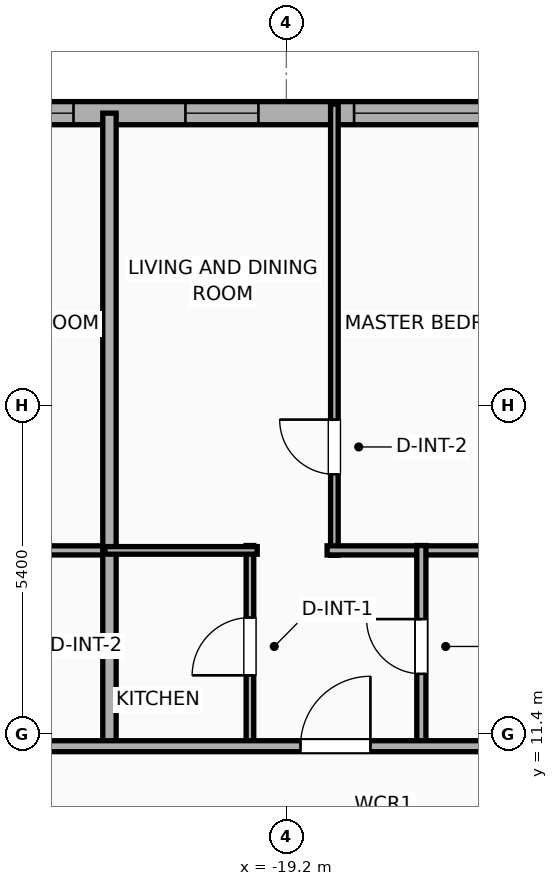
"""IFC4 building model, lengths in metres.
Left out: names, types, materials, properties, quantities, classifications, styles, units other than length and angle.
Written with IfcOpenShell. Run it as: python <this file> out.ifc"""

import sys

from ifc_helpers import new_model, si_unit, direction, frame, frame_2d, origin, place, context, subcontext, project, spatial, rectangle, extrude, element, fill, save


model = new_model("IFC4")
c1 = context("Model", 3, precision=1e-05, world=origin(), true_north=direction((0.0, 1.0)))
c2 = subcontext(c1, "Body", "Model", "MODEL_VIEW")
j1 = project(units=[si_unit("LENGTHUNIT", "METRE"), si_unit("PLANEANGLEUNIT", "RADIAN")], contexts=[c1])
p1 = place(None, origin())
s1 = spatial("IfcSite", under=j1, at=p1, CompositionType="ELEMENT")
p2 = place(p1, origin())
s2 = spatial("IfcBuilding", under=s1, at=p2, CompositionType="ELEMENT")
p3 = place(p2, frame((0.0, 0.0, 120.9)))
s3 = spatial("IfcBuildingStorey", under=s2, at=p3, CompositionType="ELEMENT", Elevation=120.9)
p4 = place(p3, frame((-25.381, 21.61, 0.0), z_axis=(0.0, 0.0, 1.0), x_axis=(1.0, 0.0, 0.0)))
e1 = element("IfcWall", 1, at=p4, inside=s3, PredefinedType="ELEMENTEDWALL", context=c2, shape_type="SweptSolid", body=[
    extrude(rectangle(XDim=54.763, YDim=0.38, at=frame_2d((27.381, 0.0))), origin(), (0.0, 0.0, 1.0), 3.65),
])
p5 = place(p4, frame((7.295, 0.0, 0.75)))
e2 = element("IfcOpeningElement", 2, at=p5, cuts=e1, PredefinedType="OPENING", context=c2, shape_type="SweptSolid", body=[
    extrude(rectangle(XDim=2.4, YDim=2.1, at=frame_2d((1.2, 1.05))), frame((0.0, 0.2, 0.0), z_axis=(0.0, -1.0, 0.0), x_axis=(1.0, 0.0, 0.0)), (0.0, 0.0, 1.0), 0.4),
])
p6 = place(p4, frame((17.686, 0.0, 0.75)))
e3 = element("IfcOpeningElement", 3, at=p6, cuts=e1, PredefinedType="OPENING", context=c2, shape_type="SweptSolid", body=[
    extrude(rectangle(XDim=2.4, YDim=2.1, at=frame_2d((1.2, 1.05))), frame((0.0, 0.2, 0.0), z_axis=(0.0, -1.0, 0.0), x_axis=(1.0, 0.0, 0.0)), (0.0, 0.0, 1.0), 0.4),
])
p7 = place(p4, frame((45.867, 0.0, 0.75)))
e4 = element("IfcOpeningElement", 4, at=p7, cuts=e1, PredefinedType="OPENING", context=c2, shape_type="SweptSolid", body=[
    extrude(rectangle(XDim=2.4, YDim=2.1, at=frame_2d((1.2, 1.05))), frame((0.0, 0.2, 0.0), z_axis=(0.0, -1.0, 0.0), x_axis=(1.0, 0.0, 0.0)), (0.0, 0.0, 1.0), 0.4),
])
p8 = place(p4, frame((1.481, 0.0, 0.75)))
e5 = element("IfcOpeningElement", 5, at=p8, cuts=e1, PredefinedType="OPENING", context=c2, shape_type="SweptSolid", body=[
    extrude(rectangle(XDim=1.2, YDim=2.05, at=frame_2d((0.6, 1.025))), frame((0.0, 0.2, 0.0), z_axis=(0.0, -1.0, 0.0), x_axis=(1.0, 0.0, 0.0)), (0.0, 0.0, 1.0), 0.4),
])
p9 = place(p4, frame((4.522, 0.0, 0.75)))
e6 = element("IfcOpeningElement", 6, at=p9, cuts=e1, PredefinedType="OPENING", context=c2, shape_type="SweptSolid", body=[
    extrude(rectangle(XDim=1.2, YDim=2.05, at=frame_2d((0.6, 1.025))), frame((0.0, 0.2, 0.0), z_axis=(0.0, -1.0, 0.0), x_axis=(1.0, 0.0, 0.0)), (0.0, 0.0, 1.0), 0.4),
])
p10 = place(p4, frame((11.696, 0.0, 0.75)))
e7 = element("IfcOpeningElement", 7, at=p10, cuts=e1, PredefinedType="OPENING", context=c2, shape_type="SweptSolid", body=[
    extrude(rectangle(XDim=1.2, YDim=2.05, at=frame_2d((0.6, 1.025))), frame((0.0, 0.2, 0.0), z_axis=(0.0, -1.0, 0.0), x_axis=(1.0, 0.0, 0.0)), (0.0, 0.0, 1.0), 0.4),
])
p11 = place(p4, frame((15.076, 0.0, 0.75)))
e8 = element("IfcOpeningElement", 8, at=p11, cuts=e1, PredefinedType="OPENING", context=c2, shape_type="SweptSolid", body=[
    extrude(rectangle(XDim=1.2, YDim=2.05, at=frame_2d((0.6, 1.025))), frame((0.0, 0.2, 0.0), z_axis=(0.0, -1.0, 0.0), x_axis=(1.0, 0.0, 0.0)), (0.0, 0.0, 1.0), 0.4),
])
p12 = place(p4, frame((22.676, 0.0, 0.75)))
e9 = element("IfcOpeningElement", 9, at=p12, cuts=e1, PredefinedType="OPENING", context=c2, shape_type="SweptSolid", body=[
    extrude(rectangle(XDim=1.2, YDim=2.05, at=frame_2d((0.6, 1.025))), frame((0.0, 0.2, 0.0), z_axis=(0.0, -1.0, 0.0), x_axis=(1.0, 0.0, 0.0)), (0.0, 0.0, 1.0), 0.4),
])
p13 = place(p4, frame((25.576, 0.0, 0.75)))
e10 = element("IfcOpeningElement", 10, at=p13, cuts=e1, PredefinedType="OPENING", context=c2, shape_type="SweptSolid", body=[
    extrude(rectangle(XDim=1.2, YDim=2.05, at=frame_2d((0.6, 1.025))), frame((0.0, 0.2, 0.0), z_axis=(0.0, -1.0, 0.0), x_axis=(1.0, 0.0, 0.0)), (0.0, 0.0, 1.0), 0.4),
])
p14 = place(p4, frame((29.076, 0.0, 0.75)))
e11 = element("IfcOpeningElement", 11, at=p14, cuts=e1, PredefinedType="OPENING", context=c2, shape_type="SweptSolid", body=[
    extrude(rectangle(XDim=1.2, YDim=2.05, at=frame_2d((0.6, 1.025))), frame((0.0, 0.2, 0.0), z_axis=(0.0, -1.0, 0.0), x_axis=(1.0, 0.0, 0.0)), (0.0, 0.0, 1.0), 0.4),
])
p15 = place(p4, frame((33.591, 0.0, 0.75)))
e12 = element("IfcOpeningElement", 12, at=p15, cuts=e1, PredefinedType="OPENING", context=c2, shape_type="SweptSolid", body=[
    extrude(rectangle(XDim=0.85, YDim=2.05, at=frame_2d((0.425, 1.025))), frame((0.0, 0.2, 0.0), z_axis=(0.0, -1.0, 0.0), x_axis=(1.0, 0.0, 0.0)), (0.0, 0.0, 1.0), 0.4),
])
p16 = place(p4, frame((36.076, 0.0, 0.75)))
e13 = element("IfcOpeningElement", 13, at=p16, cuts=e1, PredefinedType="OPENING", context=c2, shape_type="SweptSolid", body=[
    extrude(rectangle(XDim=1.2, YDim=2.05, at=frame_2d((0.6, 1.025))), frame((0.0, 0.2, 0.0), z_axis=(0.0, -1.0, 0.0), x_axis=(1.0, 0.0, 0.0)), (0.0, 0.0, 1.0), 0.4),
])
p17 = place(p4, frame((39.446, 0.0, 0.75)))
e14 = element("IfcOpeningElement", 14, at=p17, cuts=e1, PredefinedType="OPENING", context=c2, shape_type="SweptSolid", body=[
    extrude(rectangle(XDim=1.2, YDim=2.05, at=frame_2d((0.6, 1.025))), frame((0.0, 0.2, 0.0), z_axis=(0.0, -1.0, 0.0), x_axis=(1.0, 0.0, 0.0)), (0.0, 0.0, 1.0), 0.4),
])
p18 = place(p4, frame((42.27, 0.0, 0.75)))
e15 = element("IfcOpeningElement", 15, at=p18, cuts=e1, PredefinedType="OPENING", context=c2, shape_type="SweptSolid", body=[
    extrude(rectangle(XDim=0.85, YDim=2.05, at=frame_2d((0.425, 1.025))), frame((0.0, 0.2, 0.0), z_axis=(0.0, -1.0, 0.0), x_axis=(1.0, 0.0, 0.0)), (0.0, 0.0, 1.0), 0.4),
])
p19 = place(p4, frame((49.554, 0.0, 0.75)))
e16 = element("IfcOpeningElement", 16, at=p19, cuts=e1, PredefinedType="OPENING", context=c2, shape_type="SweptSolid", body=[
    extrude(rectangle(XDim=1.2, YDim=2.05, at=frame_2d((0.6, 1.025))), frame((0.0, 0.2, 0.0), z_axis=(0.0, -1.0, 0.0), x_axis=(1.0, 0.0, 0.0)), (0.0, 0.0, 1.0), 0.4),
])
p20 = place(p4, frame((52.266, 0.0, 0.75)))
e17 = element("IfcOpeningElement", 17, at=p20, cuts=e1, PredefinedType="OPENING", context=c2, shape_type="SweptSolid", body=[
    extrude(rectangle(XDim=1.2, YDim=2.05, at=frame_2d((0.6, 1.025))), frame((0.0, 0.2, 0.0), z_axis=(0.0, -1.0, 0.0), x_axis=(1.0, 0.0, 0.0)), (0.0, 0.0, 1.0), 0.4),
])
p21 = place(p3, frame((-25.639, 14.42, 0.0), z_axis=(0.0, 0.0, 1.0), x_axis=(1.0, 0.0, 0.0)))
e18 = element("IfcWall", 18, at=p21, inside=s3, PredefinedType="PLUMBINGWALL", context=c2, shape_type="SweptSolid", body=[
    extrude(rectangle(XDim=3.605, YDim=0.15, at=frame_2d((1.802, 0.0))), origin(), (0.0, 0.0, 1.0), 3.65),
])
p22 = place(p3, frame((-22.109, 11.12, 0.0), z_axis=(0.0, 0.0, 1.0), x_axis=(0.0, 1.0, 0.0)))
e19 = element("IfcWall", 19, at=p22, inside=s3, PredefinedType="PARTITIONING", context=c2, shape_type="SweptSolid", body=[
    extrude(rectangle(XDim=10.49, YDim=0.22, at=frame_2d((5.245, 0.0))), origin(), (0.0, 0.0, 1.0), 3.65),
])
p23 = place(p3, frame((-18.41, 14.34, 0.0), z_axis=(0.0, 0.0, 1.0), x_axis=(0.0, 1.0, 0.0)))
e20 = element("IfcWall", 20, at=p23, inside=s3, PredefinedType="PARTITIONING", context=c2, shape_type="SweptSolid", body=[
    extrude(rectangle(XDim=7.42, YDim=0.125, at=frame_2d((3.71, 0.0))), origin(), (0.0, 0.0, 1.0), 3.65),
])
p24 = place(p23, frame((1.331, 0.0, 0.0)))
e21 = element("IfcOpeningElement", 21, at=p24, cuts=e20, PredefinedType="OPENING", context=c2, shape_type="SweptSolid", body=[
    extrude(rectangle(XDim=0.9, YDim=2.05, at=frame_2d((0.45, 1.025))), frame((0.0, 0.073, 0.0), z_axis=(0.0, -1.0, 0.0), x_axis=(1.0, 0.0, 0.0)), (0.0, 0.0, 1.0), 0.145),
])
p25 = place(p3, frame((-18.53, 14.42, 0.0), z_axis=(0.0, 0.0, 1.0), x_axis=(1.0, 0.0, 0.0)))
e22 = element("IfcWall", 22, at=p25, inside=s3, PredefinedType="PLUMBINGWALL", context=c2, shape_type="SweptSolid", body=[
    extrude(rectangle(XDim=3.605, YDim=0.15, at=frame_2d((1.802, 0.0))), origin(), (0.0, 0.0, 1.0), 3.65),
])
p26 = place(p3, frame((-19.799, 11.18, 0.0), z_axis=(0.0, 0.0, 1.0), x_axis=(0.0, 1.0, 0.0)))
e23 = element("IfcWall", 23, at=p26, inside=s3, PredefinedType="PARTITIONING", context=c2, shape_type="SweptSolid", body=[
    extrude(rectangle(XDim=3.32, YDim=0.125, at=frame_2d((1.66, 0.0))), origin(), (0.0, 0.0, 1.0), 3.65),
])
p27 = place(p26, frame((1.185, 0.0, 0.0)))
e24 = element("IfcOpeningElement", 24, at=p27, cuts=e23, PredefinedType="OPENING", context=c2, shape_type="SweptSolid", body=[
    extrude(rectangle(XDim=0.95, YDim=2.05, at=frame_2d((0.475, 1.025))), frame((0.0, 0.073, 0.0), z_axis=(0.0, -1.0, 0.0), x_axis=(1.0, 0.0, 0.0)), (0.0, 0.0, 1.0), 0.145),
])
p28 = place(p3, frame((-22.184, 14.42, 0.0), z_axis=(0.0, 0.0, 1.0), x_axis=(1.0, 0.0, 0.0)))
e25 = element("IfcWall", 25, at=p28, inside=s3, PredefinedType="PARTITIONING", context=c2, shape_type="SweptSolid", body=[
    extrude(rectangle(XDim=2.505, YDim=0.125, at=frame_2d((1.252, 0.0))), origin(), (0.0, 0.0, 1.0), 3.65),
])
p29 = place(p3, frame((-16.98, 11.18, 0.0), z_axis=(0.0, 0.0, 1.0), x_axis=(0.0, 1.0, 0.0)))
e26 = element("IfcWall", 26, at=p29, inside=s3, PredefinedType="PLUMBINGWALL", context=c2, shape_type="SweptSolid", body=[
    extrude(rectangle(XDim=3.32, YDim=0.15, at=frame_2d((1.66, 0.0))), origin(), (0.0, 0.0, 1.0), 3.65),
])
p30 = place(p29, frame((1.21, 0.0, 0.0)))
e27 = element("IfcOpeningElement", 27, at=p30, cuts=e26, PredefinedType="OPENING", context=c2, shape_type="SweptSolid", body=[
    extrude(rectangle(XDim=0.9, YDim=2.05, at=frame_2d((0.45, 1.025))), frame((0.0, 0.085, 0.0), z_axis=(0.0, -1.0, 0.0), x_axis=(1.0, 0.0, 0.0)), (0.0, 0.0, 1.0), 0.17),
])
p31 = place(p3, frame((-29.21, 11.2, 0.0), z_axis=(0.0, 0.0, 1.0), x_axis=(1.0, 0.0, 0.0)))
e28 = element("IfcWall", 28, at=p31, inside=s3, PredefinedType="PARTITIONING", context=c2, shape_type="SweptSolid", body=[
    extrude(rectangle(XDim=62.42, YDim=0.18, at=frame_2d((31.21, 0.0))), origin(), (0.0, 0.0, 1.0), 3.65),
])
p32 = place(p31, frame((3.108, 0.0, 0.0)))
e29 = element("IfcOpeningElement", 29, at=p32, cuts=e28, PredefinedType="OPENING", context=c2, shape_type="SweptSolid", body=[
    extrude(rectangle(XDim=1.15, YDim=2.05, at=frame_2d((0.575, 1.025))), frame((0.0, 0.1, 0.0), z_axis=(0.0, -1.0, 0.0), x_axis=(1.0, 0.0, 0.0)), (0.0, 0.0, 1.0), 0.2),
])
p33 = place(p31, frame((10.242, 0.0, 0.0)))
e30 = element("IfcOpeningElement", 30, at=p33, cuts=e28, PredefinedType="OPENING", context=c2, shape_type="SweptSolid", body=[
    extrude(rectangle(XDim=1.15, YDim=2.05, at=frame_2d((0.575, 1.025))), frame((0.0, 0.1, 0.0), z_axis=(0.0, -1.0, 0.0), x_axis=(1.0, 0.0, 0.0)), (0.0, 0.0, 1.0), 0.2),
])
p34 = place(p31, frame((17.427, 0.0, 0.0)))
e31 = element("IfcOpeningElement", 31, at=p34, cuts=e28, PredefinedType="OPENING", context=c2, shape_type="SweptSolid", body=[
    extrude(rectangle(XDim=0.9, YDim=2.05, at=frame_2d((0.45, 1.025))), frame((0.0, 0.1, 0.0), z_axis=(0.0, -1.0, 0.0), x_axis=(1.0, 0.0, 0.0)), (0.0, 0.0, 1.0), 0.2),
])
p35 = place(p31, frame((24.424, 0.0, 0.0)))
e32 = element("IfcOpeningElement", 32, at=p35, cuts=e28, PredefinedType="OPENING", context=c2, shape_type="SweptSolid", body=[
    extrude(rectangle(XDim=0.9, YDim=2.05, at=frame_2d((0.45, 1.025))), frame((0.0, 0.1, 0.0), z_axis=(0.0, -1.0, 0.0), x_axis=(1.0, 0.0, 0.0)), (0.0, 0.0, 1.0), 0.2),
])
p36 = place(p31, frame((31.428, 0.0, 0.0)))
e33 = element("IfcOpeningElement", 33, at=p36, cuts=e28, PredefinedType="OPENING", context=c2, shape_type="SweptSolid", body=[
    extrude(rectangle(XDim=0.9, YDim=2.05, at=frame_2d((0.45, 1.025))), frame((0.0, 0.1, 0.0), z_axis=(0.0, -1.0, 0.0), x_axis=(1.0, 0.0, 0.0)), (0.0, 0.0, 1.0), 0.2),
])
p37 = place(p31, frame((38.425, 0.0, 0.0)))
e34 = element("IfcOpeningElement", 34, at=p37, cuts=e28, PredefinedType="OPENING", context=c2, shape_type="SweptSolid", body=[
    extrude(rectangle(XDim=0.9, YDim=2.05, at=frame_2d((0.45, 1.025))), frame((0.0, 0.1, 0.0), z_axis=(0.0, -1.0, 0.0), x_axis=(1.0, 0.0, 0.0)), (0.0, 0.0, 1.0), 0.2),
])
p38 = place(p31, frame((45.298, 0.0, 0.0)))
e35 = element("IfcOpeningElement", 35, at=p38, cuts=e28, PredefinedType="OPENING", context=c2, shape_type="SweptSolid", body=[
    extrude(rectangle(XDim=0.9, YDim=2.05, at=frame_2d((0.45, 1.025))), frame((0.0, 0.1, 0.0), z_axis=(0.0, -1.0, 0.0), x_axis=(1.0, 0.0, 0.0)), (0.0, 0.0, 1.0), 0.2),
])
p39 = place(p31, frame((52.033, 0.0, 0.0)))
e36 = element("IfcOpeningElement", 36, at=p39, cuts=e28, PredefinedType="OPENING", context=c2, shape_type="SweptSolid", body=[
    extrude(rectangle(XDim=0.9, YDim=2.05, at=frame_2d((0.45, 1.025))), frame((0.0, 0.1, 0.0), z_axis=(0.0, -1.0, 0.0), x_axis=(1.0, 0.0, 0.0)), (0.0, 0.0, 1.0), 0.2),
])
p40 = place(p31, frame((58.805, 0.0, 0.0)))
e37 = element("IfcOpeningElement", 37, at=p40, cuts=e28, PredefinedType="OPENING", context=c2, shape_type="SweptSolid", body=[
    extrude(rectangle(XDim=0.9, YDim=2.05, at=frame_2d((0.45, 1.025))), frame((0.0, 0.1, 0.0), z_axis=(0.0, -1.0, 0.0), x_axis=(1.0, 0.0, 0.0)), (0.0, 0.0, 1.0), 0.2),
])
p41 = place(p5, origin())
e38 = element("IfcWindow", 38, at=p41, inside=s3, PartitioningType="SINGLE_PANEL", PredefinedType="WINDOW", context=c2, shape_type="SweptSolid", body=[
    extrude(rectangle(XDim=2.4, YDim=2.1, at=frame_2d((1.2, 1.05))), frame((0.0, 0.03, 0.0), z_axis=(0.0, -1.0, 0.0), x_axis=(1.0, 0.0, 0.0)), (0.0, 0.0, 1.0), 0.06),
])
fill(e2, e38)
p42 = place(p8, origin())
e39 = element("IfcWindow", 39, at=p42, inside=s3, PartitioningType="SINGLE_PANEL", PredefinedType="WINDOW", context=c2, shape_type="SweptSolid", body=[
    extrude(rectangle(XDim=1.2, YDim=2.05, at=frame_2d((0.6, 1.025))), frame((0.0, 0.03, 0.0), z_axis=(0.0, -1.0, 0.0), x_axis=(1.0, 0.0, 0.0)), (0.0, 0.0, 1.0), 0.06),
])
fill(e5, e39)
p43 = place(p9, origin())
e40 = element("IfcWindow", 40, at=p43, inside=s3, PartitioningType="SINGLE_PANEL", PredefinedType="WINDOW", context=c2, shape_type="SweptSolid", body=[
    extrude(rectangle(XDim=1.2, YDim=2.05, at=frame_2d((0.6, 1.025))), frame((0.0, 0.03, 0.0), z_axis=(0.0, -1.0, 0.0), x_axis=(1.0, 0.0, 0.0)), (0.0, 0.0, 1.0), 0.06),
])
fill(e6, e40)
p44 = place(p24, origin())
e41 = element("IfcDoor", 41, at=p44, inside=s3, OperationType="SINGLE_SWING_RIGHT", PredefinedType="DOOR", context=c2, shape_type="SweptSolid", body=[
    extrude(rectangle(XDim=0.9, YDim=2.05, at=frame_2d((0.45, 1.025))), frame((0.0, 0.025, 0.0), z_axis=(0.0, -1.0, 0.0), x_axis=(1.0, 0.0, 0.0)), (0.0, 0.0, 1.0), 0.05),
])
fill(e21, e41)
p45 = place(p27, origin())
e42 = element("IfcDoor", 42, at=p45, inside=s3, OperationType="SINGLE_SWING_LEFT", PredefinedType="DOOR", context=c2, shape_type="SweptSolid", body=[
    extrude(rectangle(XDim=0.95, YDim=2.05, at=frame_2d((0.475, 1.025))), frame((0.0, 0.025, 0.0), z_axis=(0.0, -1.0, 0.0), x_axis=(1.0, 0.0, 0.0)), (0.0, 0.0, 1.0), 0.05),
])
fill(e24, e42)
p46 = place(p30, origin())
e43 = element("IfcDoor", 43, at=p46, inside=s3, OperationType="SINGLE_SWING_RIGHT", PredefinedType="DOOR", context=c2, shape_type="SweptSolid", body=[
    extrude(rectangle(XDim=0.9, YDim=2.05, at=frame_2d((0.45, 1.025))), frame((0.0, 0.025, 0.0), z_axis=(0.0, -1.0, 0.0), x_axis=(1.0, 0.0, 0.0)), (0.0, 0.0, 1.0), 0.05),
])
fill(e27, e43)
p47 = place(p33, origin())
e44 = element("IfcDoor", 44, at=p47, inside=s3, OperationType="SINGLE_SWING_RIGHT", PredefinedType="DOOR", context=c2, shape_type="SweptSolid", body=[
    extrude(rectangle(XDim=1.15, YDim=2.05, at=frame_2d((0.575, 1.025))), frame((0.0, 0.025, 0.0), z_axis=(0.0, -1.0, 0.0), x_axis=(1.0, 0.0, 0.0)), (0.0, 0.0, 1.0), 0.05),
])
fill(e30, e44)
save(model, sys.argv[1])
